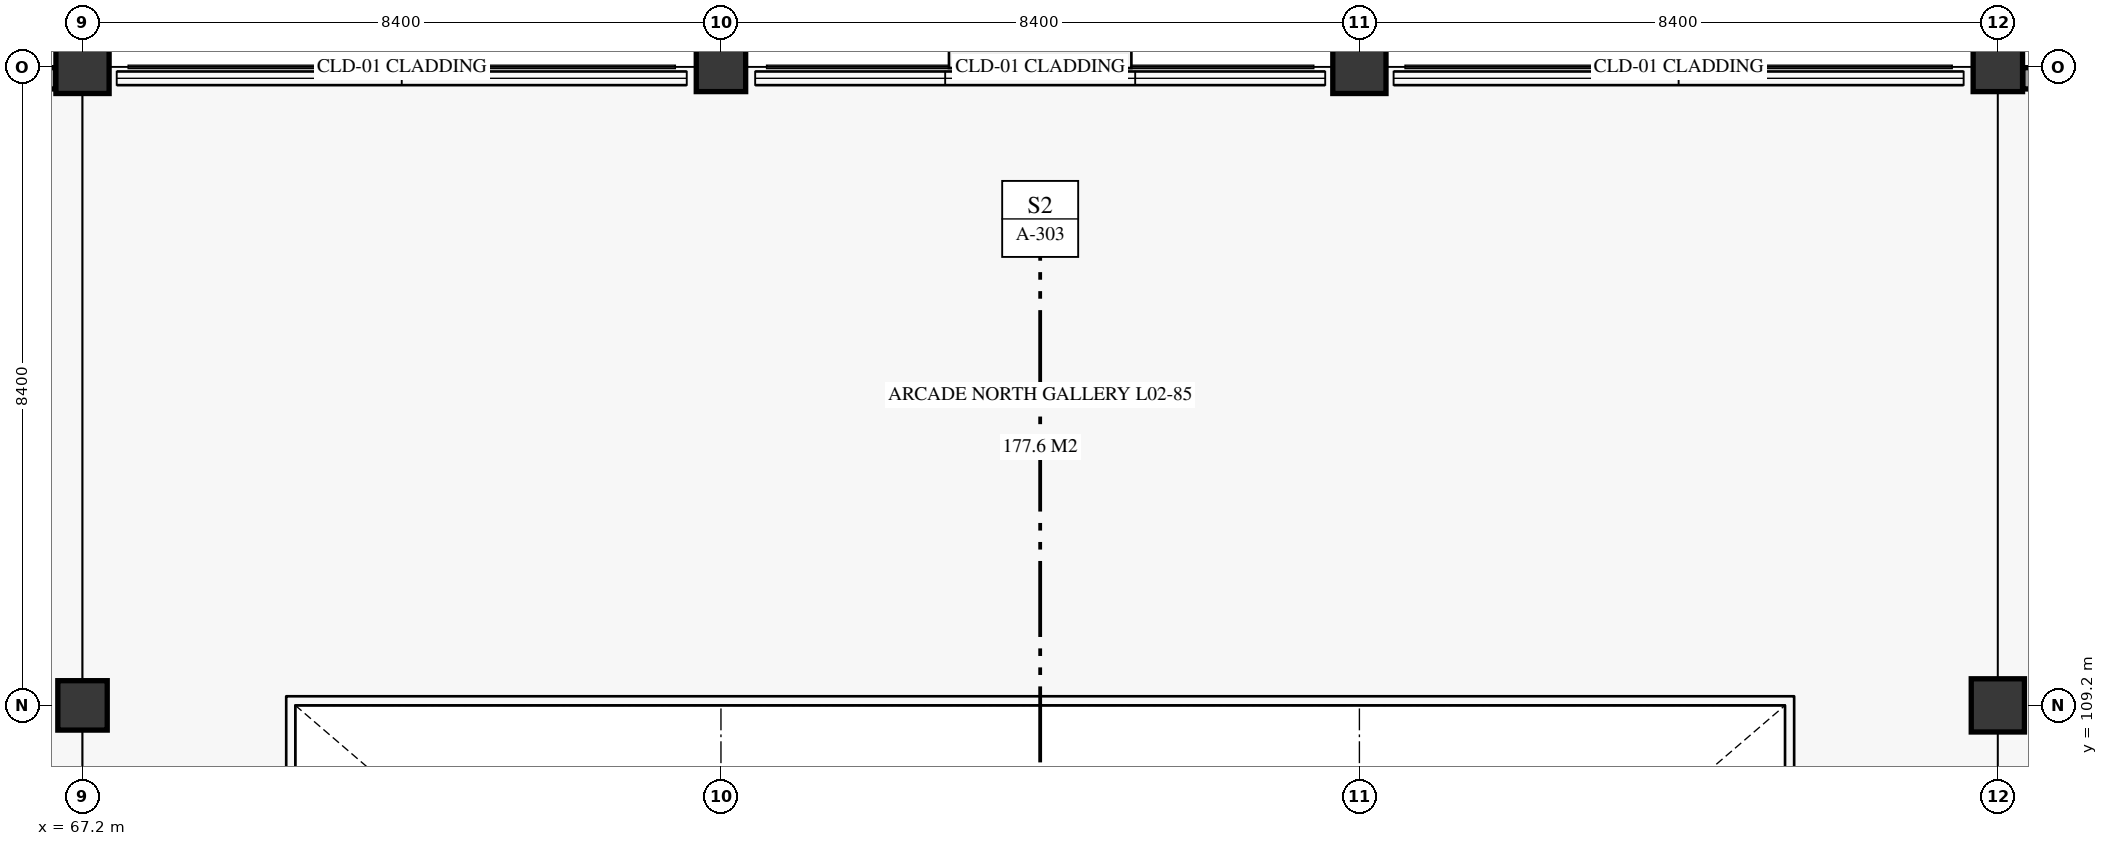
"""IFC4 building model, lengths in metres.
Left out: names, types, materials, properties, quantities, classifications, styles, units other than length and angle.
Written with IfcOpenShell. Run it as: python <this file> out.ifc"""

import sys

from ifc_helpers import new_model, si_unit, direction, frame, frame_2d, origin, origin_2d, place, context, subcontext, project, spatial, rectangle, extrude, element, save


model = new_model("IFC4")
c1 = context("Model", 3, precision=1e-05, world=origin(), true_north=direction((0.0, 1.0)))
c2 = subcontext(c1, "Body", "Model", "MODEL_VIEW")
j1 = project(units=[si_unit("LENGTHUNIT", "METRE"), si_unit("PLANEANGLEUNIT", "RADIAN")], contexts=[c1])
p1 = place(None, origin())
s1 = spatial("IfcSite", under=j1, at=p1, CompositionType="ELEMENT")
p2 = place(p1, origin())
s2 = spatial("IfcBuilding", under=s1, at=p2, CompositionType="ELEMENT")
p3 = place(p2, frame((0.0, 0.0, 6.0)))
s3 = spatial("IfcBuildingStorey", under=s2, at=p3, CompositionType="ELEMENT", Elevation=6.0)
p4 = place(p3, frame((67.2, 109.2, 0.0), z_axis=(0.0, 0.0, 1.0), x_axis=(1.0, 0.0, 0.0)))
e1 = element("IfcColumn", 1, at=p4, inside=s3, PredefinedType="COLUMN", context=c2, shape_type="SweptSolid", body=[
    extrude(rectangle(XDim=0.65, YDim=0.65, at=origin_2d()), origin(), (0.0, 0.0, 1.0), 5.1),
])
p5 = place(p3, frame((67.2, 117.6, 0.0), z_axis=(0.0, 0.0, 1.0), x_axis=(1.0, 0.0, 0.0)))
e2 = element("IfcColumn", 2, at=p5, inside=s3, PredefinedType="COLUMN", context=c2, shape_type="SweptSolid", body=[
    extrude(rectangle(XDim=0.7, YDim=0.7, at=origin_2d()), origin(), (0.0, 0.0, 1.0), 5.1),
])
p6 = place(p3, frame((75.6, 117.6, 0.0), z_axis=(0.0, 0.0, 1.0), x_axis=(1.0, 0.0, 0.0)))
e3 = element("IfcColumn", 3, at=p6, inside=s3, PredefinedType="COLUMN", context=c2, shape_type="SweptSolid", body=[
    extrude(rectangle(XDim=0.65, YDim=0.65, at=origin_2d()), origin(), (0.0, 0.0, 1.0), 5.1),
])
for number, where, z_axis, x_axis in (
    (4, (84.0, 117.6, 0.0), (0.0, 0.0, 1.0), (1.0, 0.0, 0.0)),
    (5, (92.4, 109.2, 0.0), (0.0, 0.0, 1.0), (1.0, 0.0, 0.0)),
):
    element("IfcColumn", number, at=place(p3, frame(where, z_axis=z_axis, x_axis=x_axis)), inside=s3, PredefinedType="COLUMN", context=c2, shape_type="SweptSolid", body=[
        extrude(rectangle(XDim=0.7, YDim=0.7, at=origin_2d()), origin(), (0.0, 0.0, 1.0), 5.1),
    ])
p7 = place(p3, frame((92.4, 117.6, 0.0), z_axis=(0.0, 0.0, 1.0), x_axis=(1.0, 0.0, 0.0)))
e6 = element("IfcColumn", 6, at=p7, inside=s3, PredefinedType="COLUMN", context=c2, shape_type="SweptSolid", body=[
    extrude(rectangle(XDim=0.65, YDim=0.65, at=origin_2d()), origin(), (0.0, 0.0, 1.0), 5.1),
])
p8 = place(p3, frame((59.128, 117.45, 0.0), z_axis=(0.0, 0.0, 1.0), x_axis=(1.0, 0.0, 0.0)))
e7 = element("IfcWall", 7, at=p8, inside=s3, PredefinedType="SOLIDWALL", context=c2, shape_type="SweptSolid", body=[
    extrude(rectangle(XDim=7.72, YDim=0.28, at=frame_2d((3.86, 0.0))), origin(), (0.0, 0.0, 1.0), 4.38),
])
p9 = place(p8, frame((2.572, 0.0, 0.95)))
e8 = element("IfcOpeningElement", 8, at=p9, cuts=e7, PredefinedType="OPENING", context=c2, shape_type="SweptSolid", body=[
    extrude(rectangle(XDim=2.6, YDim=2.1, at=frame_2d((1.3, 1.05))), frame((0.0, 0.15, 0.0), z_axis=(0.0, -1.0, 0.0), x_axis=(1.0, 0.0, 0.0)), (0.0, 0.0, 1.0), 0.3),
])
p10 = place(p3, frame((92.728, 117.45, 0.0), z_axis=(0.0, 0.0, 1.0), x_axis=(1.0, 0.0, 0.0)))
e9 = element("IfcWall", 9, at=p10, inside=s3, PredefinedType="SOLIDWALL", context=c2, shape_type="SweptSolid", body=[
    extrude(rectangle(XDim=7.72, YDim=0.28, at=frame_2d((3.86, 0.0))), origin(), (0.0, 0.0, 1.0), 4.38),
])
p11 = place(p10, frame((2.272, 0.0, 0.95)))
e10 = element("IfcOpeningElement", 10, at=p11, cuts=e9, PredefinedType="OPENING", context=c2, shape_type="SweptSolid", body=[
    extrude(rectangle(XDim=3.2, YDim=2.15, at=frame_2d((1.6, 1.075))), frame((0.0, 0.15, 0.0), z_axis=(0.0, -1.0, 0.0), x_axis=(1.0, 0.0, 0.0)), (0.0, 0.0, 1.0), 0.3),
])
save(model, sys.argv[1])
